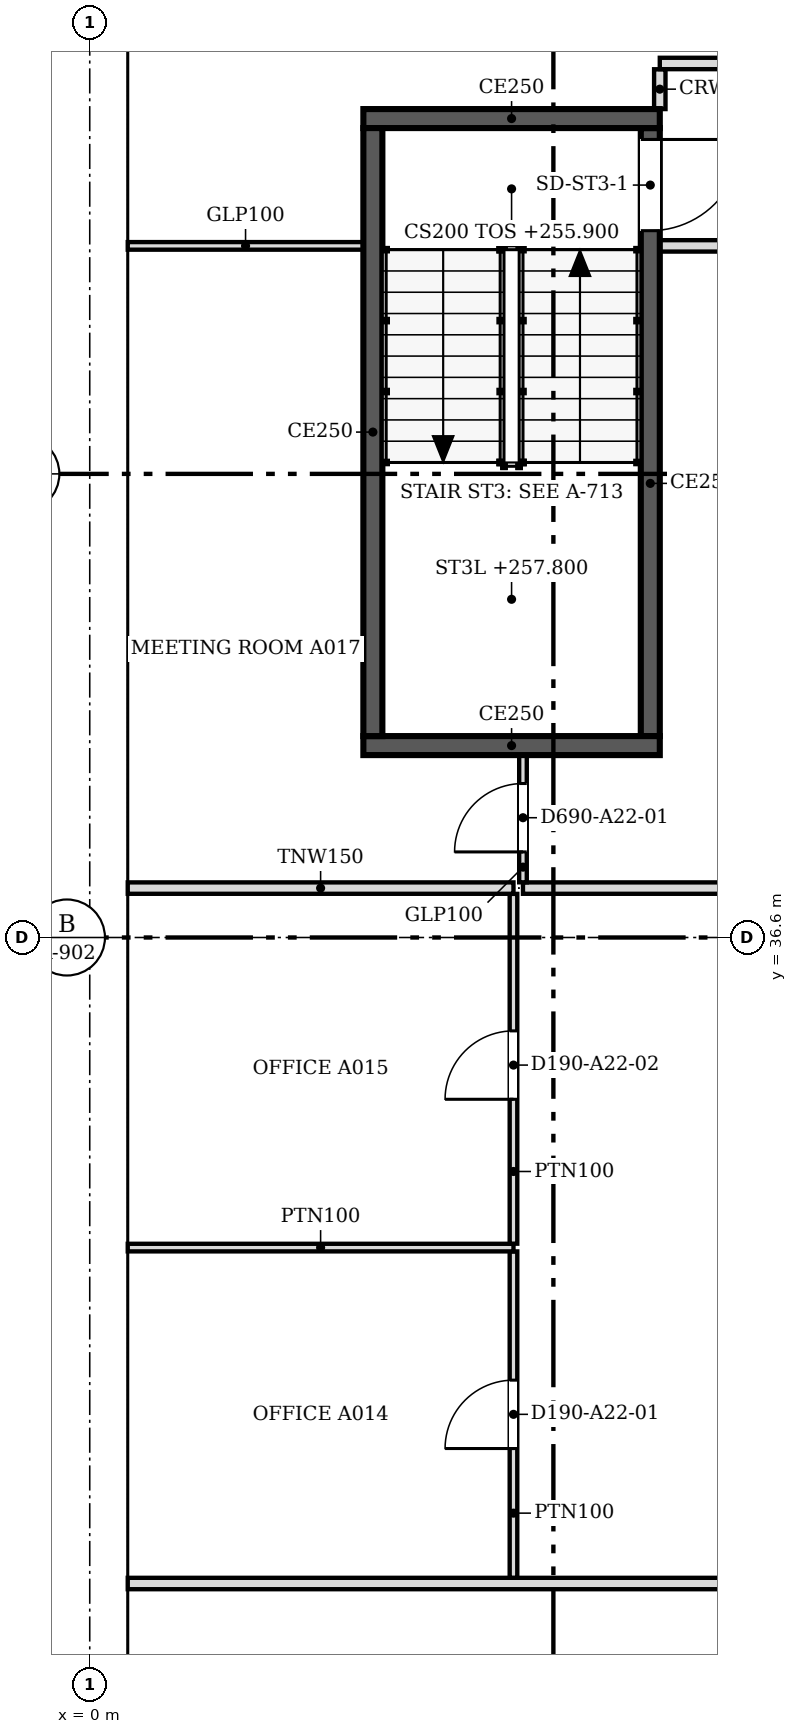
"""IFC4 building model, lengths in metres.
Left out: names, types, materials, properties, quantities, classifications, styles, units other than length and angle.
Written with IfcOpenShell. Run it as: python <this file> out.ifc"""

import sys

from ifc_helpers import new_model, si_unit, direction, frame, frame_2d, origin, place, context, subcontext, project, spatial, polyline, rectangle, outline, extrude, faceted_brep, source, transform, mapped, element, fill, save


model = new_model("IFC4")
c1 = context("Model", 3, precision=1e-05, world=origin(), true_north=direction((0.0, 1.0)))
c2 = subcontext(c1, "Body", "Model", "MODEL_VIEW")
j1 = project(units=[si_unit("LENGTHUNIT", "METRE"), si_unit("PLANEANGLEUNIT", "RADIAN")], contexts=[c1])
p1 = place(None, origin())
s1 = spatial("IfcSite", under=j1, at=p1, CompositionType="ELEMENT")
p2 = place(p1, origin())
s2 = spatial("IfcBuilding", under=s1, at=p2, CompositionType="ELEMENT")
p3 = place(p2, frame((0.0, 0.0, 255.9)))
s3 = spatial("IfcBuildingStorey", under=s2, at=p3, CompositionType="ELEMENT", Elevation=255.9)
m1 = source(origin(), c2, "Body", "Brep", [
    faceted_brep([(0.047, -0.25, 0.0), (3.05, -0.25, 3.8), (0.047, -0.25, 7.6), (0.0, -0.25, 7.54), (0.0, -0.25, 0.06), (0.093, 0.25, 7.541), (3.05, 0.25, 3.8), (0.093, 0.25, 0.059), (0.047, 0.0, 0.0), (0.047, 0.0, 7.6)], [[[0, 1, 2, 3, 4]], [[5, 6, 7]], [[7, 6, 1, 0, 8]], [[6, 5, 9, 2, 1]], [[3, 2, 9]], [[8, 0, 4]], [[7, 8, 4, 3, 9, 5]]]),
])
p4 = place(p3, frame((0.25, 48.8, -3.8), z_axis=(0.0, 0.0, 1.0), x_axis=(0.0, -1.0, 0.0)))
e1 = element("IfcWall", 1, at=p4, inside=s3, PredefinedType="SOLIDWALL", context=c2, shape_type="MappedRepresentation", body=[
    mapped(m1, transform((0.0, 0.0, 0.0), scale=1.0)),
])
m2 = source(origin(), c2, "Body", "SweptSolid", [
    extrude(outline(polyline([(0.247, 0.656), (2.731, 3.8), (0.247, 6.944), (0.247, 0.656)])), frame((0.0, 0.26, 0.0), z_axis=(0.0, -1.0, 0.0), x_axis=(1.0, 0.0, 0.0)), (0.0, 0.0, 1.0), 0.52),
])
p5 = place(p4, origin())
e2 = element("IfcOpeningElement", 2, at=p5, cuts=e1, PredefinedType="OPENING", context=c2, shape_type="MappedRepresentation", body=[
    mapped(m2, transform((0.0, 0.0, 0.0), scale=1.0)),
])
m3 = source(origin(), c2, "Body", "SweptSolid", [
    extrude(outline(polyline([(3.05, 0.0), (6.1, 3.8), (3.05, 7.6), (0.0, 3.8), (3.05, 0.0)])), frame((0.0, 0.25, 0.0), z_axis=(0.0, -1.0, 0.0), x_axis=(1.0, 0.0, 0.0)), (0.0, 0.0, 1.0), 0.5),
])
p6 = place(p3, frame((0.25, 45.75, -3.8), z_axis=(0.0, 0.0, 1.0), x_axis=(0.0, -1.0, 0.0)))
e3 = element("IfcWall", 3, at=p6, inside=s3, PredefinedType="SOLIDWALL", context=c2, shape_type="MappedRepresentation", body=[
    mapped(m3, transform((0.0, 0.0, 0.0), scale=1.0)),
])
m4 = source(origin(), c2, "Body", "SweptSolid", [
    extrude(outline(polyline([(3.05, 0.399), (5.78, 3.8), (3.05, 7.2), (0.321, 3.8), (3.05, 0.399)])), frame((0.0, 0.26, 0.0), z_axis=(0.0, -1.0, 0.0), x_axis=(1.0, 0.0, 0.0)), (0.0, 0.0, 1.0), 0.52),
])
p7 = place(p6, origin())
e4 = element("IfcOpeningElement", 4, at=p7, cuts=e3, PredefinedType="OPENING", context=c2, shape_type="MappedRepresentation", body=[
    mapped(m4, transform((0.0, 0.0, 0.0), scale=1.0)),
])
m5 = source(origin(), c2, "Body", "Brep", [
    faceted_brep([(3.05, -0.25, 0.0), (6.1, -0.25, 3.8), (6.1, -0.25, 3.8), (3.05, -0.25, 7.6), (0.0, -0.25, 3.8), (0.0, 0.25, 3.8), (3.05, 0.25, 7.6), (6.1, 0.25, 3.8), (6.1, 0.25, 3.8), (3.05, 0.25, 0.0)], [[[0, 1, 2, 3, 4]], [[5, 6, 7, 8, 9]], [[9, 8, 1, 0]], [[7, 6, 3, 2]], [[6, 5, 4, 3]], [[5, 9, 0, 4]], [[1, 8, 7, 2]]]),
])
p8 = place(p3, frame((0.25, 39.65, -3.8), z_axis=(0.0, 0.0, 1.0), x_axis=(0.0, -1.0, 0.0)))
e5 = element("IfcWall", 5, at=p8, inside=s3, PredefinedType="SOLIDWALL", context=c2, shape_type="MappedRepresentation", body=[
    mapped(m5, transform((0.0, 0.0, 0.0), scale=1.0)),
])
p9 = place(p8, origin())
e6 = element("IfcOpeningElement", 6, at=p9, cuts=e5, PredefinedType="OPENING", context=c2, shape_type="MappedRepresentation", body=[
    mapped(m4, transform((0.0, 0.0, 0.0), scale=1.0)),
])
p10 = place(p3, frame((0.25, 33.55, -3.8), z_axis=(0.0, 0.0, 1.0), x_axis=(0.0, -1.0, 0.0)))
e7 = element("IfcWall", 7, at=p10, inside=s3, PredefinedType="SOLIDWALL", context=c2, shape_type="MappedRepresentation", body=[
    mapped(m3, transform((0.0, 0.0, 0.0), scale=1.0)),
])
p11 = place(p10, origin())
e8 = element("IfcOpeningElement", 8, at=p11, cuts=e7, PredefinedType="OPENING", context=c2, shape_type="MappedRepresentation", body=[
    mapped(m4, transform((0.0, 0.0, 0.0), scale=1.0)),
])
m6 = source(origin(), c2, "Body", "Brep", [
    faceted_brep([(3.003, -0.25, 0.0), (3.05, -0.25, 0.06), (3.05, -0.25, 7.54), (3.003, -0.25, 7.6), (0.0, -0.25, 3.8), (0.0, 0.25, 3.8), (2.957, 0.25, 7.541), (2.957, 0.25, 0.059), (3.003, 0.0, 0.0), (3.003, 0.0, 7.6)], [[[0, 1, 2, 3, 4]], [[5, 6, 7]], [[1, 0, 8]], [[9, 3, 2]], [[6, 5, 4, 3, 9]], [[5, 7, 8, 0, 4]], [[1, 8, 7, 6, 9, 2]]]),
])
p12 = place(p3, frame((0.25, 27.45, -3.8), z_axis=(0.0, 0.0, 1.0), x_axis=(0.0, -1.0, 0.0)))
e9 = element("IfcWall", 9, at=p12, inside=s3, PredefinedType="SOLIDWALL", context=c2, shape_type="MappedRepresentation", body=[
    mapped(m6, transform((0.0, 0.0, 0.0), scale=1.0)),
])
m7 = source(origin(), c2, "Body", "SweptSolid", [
    extrude(outline(polyline([(2.803, 6.944), (0.319, 3.8), (2.803, 0.656), (2.803, 6.944)])), frame((0.0, 0.26, 0.0), z_axis=(0.0, -1.0, 0.0), x_axis=(1.0, 0.0, 0.0)), (0.0, 0.0, 1.0), 0.52),
])
p13 = place(p12, origin())
e10 = element("IfcOpeningElement", 10, at=p13, cuts=e9, PredefinedType="OPENING", context=c2, shape_type="MappedRepresentation", body=[
    mapped(m7, transform((0.0, 0.0, 0.0), scale=1.0)),
])
m8 = source(origin(), c2, "Body", "Brep", [
    faceted_brep([(3.003, -0.25, 0.0), (6.053, -0.25, 3.8), (0.0, -0.25, 3.8), (0.047, 0.25, 3.8), (6.053, 0.25, 3.8), (3.003, 0.25, 0.0), (0.047, 0.25, 3.741), (0.0, 0.0, 3.8)], [[[0, 1, 2]], [[3, 4, 5, 6]], [[5, 4, 1, 0]], [[4, 3, 7, 2, 1]], [[6, 5, 0, 2, 7]], [[6, 7, 3]]]),
])
p14 = place(p3, frame((0.25, 48.753, 0.0), z_axis=(0.0, 0.0, 1.0), x_axis=(0.0, -1.0, 0.0)))
e11 = element("IfcWall", 11, at=p14, inside=s3, PredefinedType="SOLIDWALL", context=c2, shape_type="MappedRepresentation", body=[
    mapped(m8, transform((0.0, 0.0, 0.0), scale=1.0)),
])
m9 = source(origin(), c2, "Body", "SweptSolid", [
    extrude(outline(polyline([(3.005, 0.401), (5.532, 3.55), (0.516, 3.55), (3.005, 0.401)])), frame((0.0, 0.26, 0.0), z_axis=(0.0, -1.0, 0.0), x_axis=(1.0, 0.0, 0.0)), (0.0, 0.0, 1.0), 0.52),
])
p15 = place(p14, origin())
e12 = element("IfcOpeningElement", 12, at=p15, cuts=e11, PredefinedType="OPENING", context=c2, shape_type="MappedRepresentation", body=[
    mapped(m9, transform((0.0, 0.0, 0.0), scale=1.0)),
])
m10 = source(origin(), c2, "Body", "Brep", [
    faceted_brep([(3.05, -0.25, 0.0), (6.1, -0.25, 3.8), (6.1, -0.25, 3.8), (0.0, -0.25, 3.8), (0.0, 0.25, 3.8), (6.1, 0.25, 3.8), (6.1, 0.25, 3.8), (3.05, 0.25, 0.0)], [[[0, 1, 2, 3]], [[4, 5, 6, 7]], [[7, 6, 1, 0]], [[5, 4, 3, 2]], [[4, 7, 0, 3]], [[1, 6, 5, 2]]]),
])
p16 = place(p3, frame((0.25, 42.7, 0.0), z_axis=(0.0, 0.0, 1.0), x_axis=(0.0, -1.0, 0.0)))
e13 = element("IfcWall", 13, at=p16, inside=s3, PredefinedType="SOLIDWALL", context=c2, shape_type="MappedRepresentation", body=[
    mapped(m10, transform((0.0, 0.0, 0.0), scale=1.0)),
])
m11 = source(origin(), c2, "Body", "SweptSolid", [
    extrude(outline(polyline([(3.05, 0.399), (5.579, 3.55), (0.521, 3.55), (3.05, 0.399)])), frame((0.0, 0.26, 0.0), z_axis=(0.0, -1.0, 0.0), x_axis=(1.0, 0.0, 0.0)), (0.0, 0.0, 1.0), 0.52),
])
p17 = place(p16, origin())
e14 = element("IfcOpeningElement", 14, at=p17, cuts=e13, PredefinedType="OPENING", context=c2, shape_type="MappedRepresentation", body=[
    mapped(m11, transform((0.0, 0.0, 0.0), scale=1.0)),
])
m12 = source(origin(), c2, "Body", "SweptSolid", [
    extrude(outline(polyline([(3.05, 0.0), (6.1, 3.8), (0.0, 3.8), (3.05, 0.0)])), frame((0.0, 0.25, 0.0), z_axis=(0.0, -1.0, 0.0), x_axis=(1.0, 0.0, 0.0)), (0.0, 0.0, 1.0), 0.5),
])
p18 = place(p3, frame((0.25, 36.6, 0.0), z_axis=(0.0, 0.0, 1.0), x_axis=(0.0, -1.0, 0.0)))
e15 = element("IfcWall", 15, at=p18, inside=s3, PredefinedType="SOLIDWALL", context=c2, shape_type="MappedRepresentation", body=[
    mapped(m12, transform((0.0, 0.0, 0.0), scale=1.0)),
])
p19 = place(p18, origin())
e16 = element("IfcOpeningElement", 16, at=p19, cuts=e15, PredefinedType="OPENING", context=c2, shape_type="MappedRepresentation", body=[
    mapped(m11, transform((0.0, 0.0, 0.0), scale=1.0)),
])
m13 = source(origin(), c2, "Body", "Brep", [
    faceted_brep([(3.05, -0.25, 0.0), (6.053, -0.25, 3.8), (0.0, -0.25, 3.8), (0.0, 0.25, 3.8), (6.007, 0.25, 3.8), (6.007, 0.25, 3.741), (3.05, 0.25, 0.0), (6.053, 0.0, 3.8)], [[[0, 1, 2]], [[3, 4, 5, 6]], [[6, 5, 7, 1, 0]], [[4, 3, 2, 1, 7]], [[3, 6, 0, 2]], [[5, 4, 7]]]),
])
p20 = place(p3, frame((0.25, 30.5, 0.0), z_axis=(0.0, 0.0, 1.0), x_axis=(0.0, -1.0, 0.0)))
e17 = element("IfcWall", 17, at=p20, inside=s3, PredefinedType="SOLIDWALL", context=c2, shape_type="MappedRepresentation", body=[
    mapped(m13, transform((0.0, 0.0, 0.0), scale=1.0)),
])
m14 = source(origin(), c2, "Body", "SweptSolid", [
    extrude(outline(polyline([(3.049, 0.401), (5.537, 3.55), (0.521, 3.55), (3.049, 0.401)])), frame((0.0, 0.26, 0.0), z_axis=(0.0, -1.0, 0.0), x_axis=(1.0, 0.0, 0.0)), (0.0, 0.0, 1.0), 0.52),
])
p21 = place(p20, origin())
e18 = element("IfcOpeningElement", 18, at=p21, cuts=e17, PredefinedType="OPENING", context=c2, shape_type="MappedRepresentation", body=[
    mapped(m14, transform((0.0, 0.0, 0.0), scale=1.0)),
])
p22 = place(p3, frame((7.5, 39.125, 0.0), z_axis=(0.0, 0.0, 1.0), x_axis=(-1.0, 0.0, 0.0)))
e19 = element("IfcWall", 19, at=p22, inside=s3, PredefinedType="SOLIDWALL", context=c2, shape_type="SweptSolid", body=[
    extrude(rectangle(XDim=3.9, YDim=0.25, at=frame_2d((1.95, 0.0))), origin(), (0.0, 0.0, 1.0), 3.8),
])
p23 = place(p3, frame((3.725, 39.25, 0.0), z_axis=(0.0, 0.0, 1.0), x_axis=(0.0, 1.0, 0.0)))
e20 = element("IfcWall", 20, at=p23, inside=s3, PredefinedType="SOLIDWALL", context=c2, shape_type="SweptSolid", body=[
    extrude(rectangle(XDim=8.0, YDim=0.25, at=frame_2d((4.0, 0.0))), origin(), (0.0, 0.0, 1.0), 3.8),
])
p24 = place(p3, frame((3.6, 47.375, 0.0), z_axis=(0.0, 0.0, 1.0), x_axis=(1.0, 0.0, 0.0)))
e21 = element("IfcWall", 21, at=p24, inside=s3, PredefinedType="SOLIDWALL", context=c2, shape_type="SweptSolid", body=[
    extrude(rectangle(XDim=3.9, YDim=0.25, at=frame_2d((1.95, 0.0))), origin(), (0.0, 0.0, 1.0), 3.8),
])
p25 = place(p3, frame((7.375, 47.25, 0.0), z_axis=(0.0, 0.0, 1.0), x_axis=(0.0, -1.0, 0.0)))
e22 = element("IfcWall", 22, at=p25, inside=s3, PredefinedType="SOLIDWALL", context=c2, shape_type="SweptSolid", body=[
    extrude(rectangle(XDim=8.0, YDim=0.25, at=frame_2d((4.0, 0.0))), origin(), (0.0, 0.0, 1.0), 3.8),
])
m15 = source(origin(), c2, "Body", "SweptSolid", [
    extrude(rectangle(XDim=1.2, YDim=2.1, at=frame_2d((0.6, 1.05))), frame((0.0, 0.135, 0.0), z_axis=(0.0, -1.0, 0.0), x_axis=(1.0, 0.0, 0.0)), (0.0, 0.0, 1.0), 0.27),
])
p26 = place(p25, frame((0.15, 0.0, 0.0)))
e23 = element("IfcOpeningElement", 23, at=p26, cuts=e22, PredefinedType="OPENING", context=c2, shape_type="MappedRepresentation", body=[
    mapped(m15, transform((0.0, 0.0, 0.0), scale=1.0)),
])
p27 = place(p3, frame((0.5, 28.1, 0.0), z_axis=(0.0, 0.0, 1.0), x_axis=(1.0, 0.0, 0.0)))
e24 = element("IfcWall", 24, at=p27, inside=s3, PredefinedType="PARTITIONING", context=c2, shape_type="SweptSolid", body=[
    extrude(rectangle(XDim=27.524, YDim=0.15, at=frame_2d((13.762, 0.0))), origin(), (0.0, 0.0, 1.0), 2.947),
])
p28 = place(p3, frame((5.575, 28.176, 0.0), z_axis=(0.0, 0.0, 1.0), x_axis=(0.0, 1.0, 0.0)))
e25 = element("IfcWall", 25, at=p28, inside=s3, PredefinedType="PARTITIONING", context=c2, shape_type="SweptSolid", body=[
    extrude(rectangle(XDim=4.293, YDim=0.1, at=frame_2d((2.146, 0.0))), origin(), (0.0, 0.0, 1.0), 2.947),
])
m16 = source(origin(), c2, "Body", "SweptSolid", [
    extrude(rectangle(XDim=0.9, YDim=2.1, at=frame_2d((0.45, 1.05))), frame((0.0, 0.06, 0.0), z_axis=(0.0, -1.0, 0.0), x_axis=(1.0, 0.0, 0.0)), (0.0, 0.0, 1.0), 0.12),
])
p29 = place(p28, frame((1.7, 0.0, 0.0)))
e26 = element("IfcOpeningElement", 26, at=p29, cuts=e25, PredefinedType="OPENING", context=c2, shape_type="MappedRepresentation", body=[
    mapped(m16, transform((0.0, 0.0, 0.0), scale=1.0)),
])
p30 = place(p3, frame((0.5, 32.52, 0.0), z_axis=(0.0, 0.0, 1.0), x_axis=(1.0, 0.0, 0.0)))
e27 = element("IfcWall", 27, at=p30, inside=s3, PredefinedType="PARTITIONING", context=c2, shape_type="SweptSolid", body=[
    extrude(rectangle(XDim=5.075, YDim=0.1, at=frame_2d((2.538, 0.0))), origin(), (0.0, 0.0, 1.0), 2.947),
])
p31 = place(p3, frame((5.575, 32.571, 0.0), z_axis=(0.0, 0.0, 1.0), x_axis=(0.0, 1.0, 0.0)))
e28 = element("IfcWall", 28, at=p31, inside=s3, PredefinedType="PARTITIONING", context=c2, shape_type="SweptSolid", body=[
    extrude(rectangle(XDim=4.603, YDim=0.1, at=frame_2d((2.301, 0.0))), origin(), (0.0, 0.0, 1.0), 2.947),
])
p32 = place(p31, frame((1.9, 0.0, 0.0)))
e29 = element("IfcOpeningElement", 29, at=p32, cuts=e28, PredefinedType="OPENING", context=c2, shape_type="MappedRepresentation", body=[
    mapped(m16, transform((0.0, 0.0, 0.0), scale=1.0)),
])
p33 = place(p3, frame((0.5, 37.25, 0.0), z_axis=(0.0, 0.0, 1.0), x_axis=(1.0, 0.0, 0.0)))
e30 = element("IfcWall", 30, at=p33, inside=s3, PredefinedType="PARTITIONING", context=c2, shape_type="SweptSolid", body=[
    extrude(rectangle(XDim=5.075, YDim=0.15, at=frame_2d((2.538, 0.0))), origin(), (0.0, 0.0, 1.0), 2.947),
])
p34 = place(p3, frame((5.7, 37.25, 0.0), z_axis=(0.0, 0.0, 1.0), x_axis=(1.0, 0.0, 0.0)))
e31 = element("IfcWall", 31, at=p34, inside=s3, PredefinedType="PARTITIONING", context=c2, shape_type="SweptSolid", body=[
    extrude(rectangle(XDim=22.324, YDim=0.15, at=frame_2d((11.162, 0.0))), origin(), (0.0, 0.0, 1.0), 2.947),
])
p35 = place(p3, frame((5.7, 37.326, 0.0), z_axis=(0.0, 0.0, 1.0), x_axis=(0.0, 1.0, 0.0)))
e32 = element("IfcWall", 32, at=p35, inside=s3, PredefinedType="PARTITIONING", context=c2, shape_type="SweptSolid", body=[
    extrude(rectangle(XDim=1.674, YDim=0.1, at=frame_2d((0.837, 0.0))), origin(), (0.0, 0.0, 1.0), 2.947),
])
p36 = place(p35, frame((0.4, 0.0, 0.0)))
e33 = element("IfcOpeningElement", 33, at=p36, cuts=e32, PredefinedType="OPENING", context=c2, shape_type="MappedRepresentation", body=[
    mapped(m16, transform((0.0, 0.0, 0.0), scale=1.0)),
])
p37 = place(p3, frame((0.5, 45.7, 0.0), z_axis=(0.0, 0.0, 1.0), x_axis=(1.0, 0.0, 0.0)))
e34 = element("IfcWall", 34, at=p37, inside=s3, PredefinedType="PARTITIONING", context=c2, shape_type="SweptSolid", body=[
    extrude(rectangle(XDim=3.1, YDim=0.1, at=frame_2d((1.55, 0.0))), origin(), (0.0, 0.0, 1.0), 2.947),
])
p38 = place(p3, frame((7.5, 45.7, 0.0), z_axis=(0.0, 0.0, 1.0), x_axis=(1.0, 0.0, 0.0)))
e35 = element("IfcWall", 35, at=p38, inside=s3, PredefinedType="PARTITIONING", context=c2, shape_type="SweptSolid", body=[
    extrude(rectangle(XDim=20.6, YDim=0.15, at=frame_2d((10.3, 0.0))), origin(), (0.0, 0.0, 1.0), 2.947),
])
p39 = place(p3, frame((7.5, 47.5, 0.0), z_axis=(0.0, 0.0, 1.0), x_axis=(0.0, 1.0, 0.0)))
e36 = element("IfcWall", 36, at=p39, inside=s3, PredefinedType="PARTITIONING", context=c2, shape_type="SweptSolid", body=[
    extrude(rectangle(XDim=0.524, YDim=0.15, at=frame_2d((0.262, 0.0))), origin(), (0.0, 0.0, 1.0), 2.947),
])
p40 = place(p3, frame((7.5, 48.1, 0.0), z_axis=(0.0, 0.0, 1.0), x_axis=(1.0, 0.0, 0.0)))
e37 = element("IfcWall", 37, at=p40, inside=s3, PredefinedType="PARTITIONING", context=c2, shape_type="SweptSolid", body=[
    extrude(rectangle(XDim=20.6, YDim=0.15, at=frame_2d((10.3, 0.0))), origin(), (0.0, 0.0, 1.0), 2.947),
])
m17 = source(origin(), c2, "Body", "SweptSolid", [
    extrude(rectangle(XDim=0.9, YDim=2.1, at=frame_2d((0.45, 1.05))), frame((0.0, 0.085, 0.0), z_axis=(0.0, -1.0, 0.0), x_axis=(1.0, 0.0, 0.0)), (0.0, 0.0, 1.0), 0.17),
])
p41 = place(p40, frame((8.701, 0.0, 0.0)))
e38 = element("IfcOpeningElement", 38, at=p41, cuts=e37, PredefinedType="OPENING", context=c2, shape_type="MappedRepresentation", body=[
    mapped(m17, transform((0.0, 0.0, 0.0), scale=1.0)),
])
p42 = place(p40, frame((2.6, 0.0, 0.0)))
e39 = element("IfcOpeningElement", 39, at=p42, cuts=e37, PredefinedType="OPENING", context=c2, shape_type="MappedRepresentation", body=[
    mapped(m17, transform((0.0, 0.0, 0.0), scale=1.0)),
])
m18 = source(origin(), c2, "Body", "SweptSolid", [
    extrude(rectangle(XDim=1.0, YDim=2.1, at=frame_2d((0.5, 1.05))), frame((0.0, 0.085, 0.0), z_axis=(0.0, -1.0, 0.0), x_axis=(1.0, 0.0, 0.0)), (0.0, 0.0, 1.0), 0.17),
])
p43 = place(p40, frame((15.7, 0.0, 0.0)))
e40 = element("IfcOpeningElement", 40, at=p43, cuts=e37, PredefinedType="OPENING", context=c2, shape_type="MappedRepresentation", body=[
    mapped(m18, transform((0.0, 0.0, 0.0), scale=1.0)),
])
m19 = source(origin(), c2, "Body", "SweptSolid", [
    extrude(rectangle(XDim=1.2, YDim=2.1, at=frame_2d((0.6, 1.05))), frame((0.0, 0.025, 0.0), z_axis=(0.0, -1.0, 0.0), x_axis=(1.0, 0.0, 0.0)), (0.0, 0.0, 1.0), 0.05),
])
p44 = place(p26, origin())
e41 = element("IfcDoor", 41, at=p44, inside=s3, OperationType="SINGLE_SWING_LEFT", PredefinedType="DOOR", context=c2, shape_type="MappedRepresentation", body=[
    mapped(m19, transform((0.0, 0.0, 0.0), scale=1.0)),
])
fill(e23, e41)
m20 = source(origin(), c2, "Body", "SweptSolid", [
    extrude(rectangle(XDim=0.9, YDim=2.1, at=frame_2d((0.45, 1.05))), frame((0.0, 0.025, 0.0), z_axis=(0.0, -1.0, 0.0), x_axis=(1.0, 0.0, 0.0)), (0.0, 0.0, 1.0), 0.05),
])
p45 = place(p36, origin())
e42 = element("IfcDoor", 42, at=p45, inside=s3, OperationType="SINGLE_SWING_LEFT", PredefinedType="DOOR", context=c2, shape_type="MappedRepresentation", body=[
    mapped(m20, transform((0.0, 0.0, 0.0), scale=1.0)),
])
fill(e33, e42)
p46 = place(p29, origin())
e43 = element("IfcDoor", 43, at=p46, inside=s3, OperationType="SINGLE_SWING_LEFT", PredefinedType="DOOR", context=c2, shape_type="MappedRepresentation", body=[
    mapped(m20, transform((0.0, 0.0, 0.0), scale=1.0)),
])
fill(e26, e43)
p47 = place(p32, origin())
e44 = element("IfcDoor", 44, at=p47, inside=s3, OperationType="SINGLE_SWING_LEFT", PredefinedType="DOOR", context=c2, shape_type="MappedRepresentation", body=[
    mapped(m20, transform((0.0, 0.0, 0.0), scale=1.0)),
])
fill(e29, e44)
save(model, sys.argv[1])
